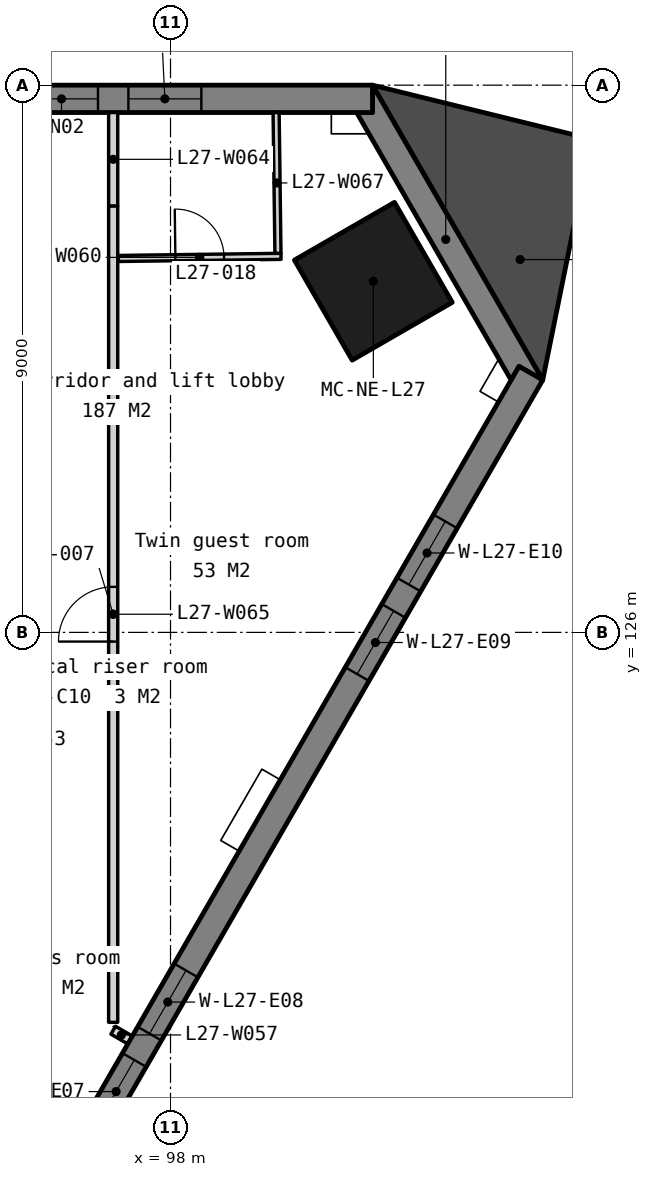
"""IFC4 building model, lengths in metres.
Left out: names, types, materials, properties, quantities, classifications, styles, units other than length and angle.
Written with IfcOpenShell. Run it as: python <this file> out.ifc"""

import sys

from ifc_helpers import new_model, si_unit, direction, frame, frame_2d, origin, origin_2d, place, context, subcontext, project, spatial, polyline, rectangle, outline, extrude, element, fill, save


model = new_model("IFC4")
c1 = context("Model", 3, precision=1e-05, world=origin(), true_north=direction((0.0, 1.0)))
c2 = subcontext(c1, "Body", "Model", "MODEL_VIEW")
j1 = project(units=[si_unit("LENGTHUNIT", "METRE"), si_unit("PLANEANGLEUNIT", "RADIAN")], contexts=[c1])
p1 = place(None, origin())
s1 = spatial("IfcSite", under=j1, at=p1, CompositionType="ELEMENT")
p2 = place(p1, origin())
s2 = spatial("IfcBuilding", under=s1, at=p2, CompositionType="ELEMENT")
p3 = place(p2, frame((0.0, 0.0, 109.8)))
s3 = spatial("IfcBuildingStorey", under=s2, at=p3, CompositionType="ELEMENT", Elevation=109.8)
p4 = place(p3, frame((101.336, 131.775, 0.0), z_axis=(0.0, 0.0, 1.0), x_axis=(-0.5, 0.866025403784, 0.0)))
e1 = element("IfcColumn", 1, at=p4, inside=s3, PredefinedType="COLUMN", context=c2, shape_type="SweptSolid", body=[
    extrude(rectangle(XDim=1.9, YDim=1.9, at=origin_2d()), origin(), (0.0, 0.0, 1.0), 3.5),
])
p5 = place(p3, frame((0.0, 0.0, -0.15)))
e2 = element("IfcWall", 2, at=p5, inside=s3, PredefinedType="SOLIDWALL", context=c2, shape_type="SweptSolid", body=[
    extrude(outline(polyline([(104.122, 130.15), (103.732, 130.375), (103.602, 130.15), (101.062, 134.55), (101.322, 134.55), (101.322, 135.0), (104.122, 130.15)])), origin(), (0.0, 0.0, 1.0), 3.5),
])
p6 = place(p3, frame((101.322, 134.775, -0.15), z_axis=(0.0, 0.0, 1.0), x_axis=(-1.0, 0.0, 0.0)))
e3 = element("IfcWall", 3, at=p6, inside=s3, PredefinedType="SOLIDWALL", context=c2, shape_type="SweptSolid", body=[
    extrude(outline(polyline([(42.643, 0.0), (42.643, 3.5), (0.0, 3.5), (0.0, 0.0), (42.643, 0.0)])), frame((0.0, 0.225, 0.0), z_axis=(0.0, -1.0, 0.0), x_axis=(1.0, 0.0, 0.0)), (0.0, 0.0, 1.0), 0.45),
])
p7 = place(p6, frame((2.814, 0.0, 1.05)))
e4 = element("IfcOpeningElement", 4, at=p7, cuts=e3, PredefinedType="OPENING", context=c2, shape_type="SweptSolid", body=[
    extrude(rectangle(XDim=1.2, YDim=1.5, at=frame_2d((0.6, 0.75))), frame((0.0, 0.235, 0.0), z_axis=(0.0, -1.0, 0.0), x_axis=(1.0, 0.0, 0.0)), (0.0, 0.0, 1.0), 0.47),
])
p8 = place(p6, frame((4.514, 0.0, 1.05)))
e5 = element("IfcOpeningElement", 5, at=p8, cuts=e3, PredefinedType="OPENING", context=c2, shape_type="SweptSolid", body=[
    extrude(rectangle(XDim=1.2, YDim=1.5, at=frame_2d((0.6, 0.75))), frame((0.0, 0.235, 0.0), z_axis=(0.0, -1.0, 0.0), x_axis=(1.0, 0.0, 0.0)), (0.0, 0.0, 1.0), 0.47),
])
p9 = place(p6, frame((11.343, 0.0, 1.05)))
e6 = element("IfcOpeningElement", 6, at=p9, cuts=e3, PredefinedType="OPENING", context=c2, shape_type="SweptSolid", body=[
    extrude(rectangle(XDim=1.2, YDim=1.5, at=frame_2d((0.6, 0.75))), frame((0.0, 0.235, 0.0), z_axis=(0.0, -1.0, 0.0), x_axis=(1.0, 0.0, 0.0)), (0.0, 0.0, 1.0), 0.47),
])
p10 = place(p6, frame((13.043, 0.0, 1.05)))
e7 = element("IfcOpeningElement", 7, at=p10, cuts=e3, PredefinedType="OPENING", context=c2, shape_type="SweptSolid", body=[
    extrude(rectangle(XDim=1.2, YDim=1.5, at=frame_2d((0.6, 0.75))), frame((0.0, 0.235, 0.0), z_axis=(0.0, -1.0, 0.0), x_axis=(1.0, 0.0, 0.0)), (0.0, 0.0, 1.0), 0.47),
])
p11 = place(p6, frame((19.872, 0.0, 1.05)))
e8 = element("IfcOpeningElement", 8, at=p11, cuts=e3, PredefinedType="OPENING", context=c2, shape_type="SweptSolid", body=[
    extrude(rectangle(XDim=1.2, YDim=1.5, at=frame_2d((0.6, 0.75))), frame((0.0, 0.235, 0.0), z_axis=(0.0, -1.0, 0.0), x_axis=(1.0, 0.0, 0.0)), (0.0, 0.0, 1.0), 0.47),
])
p12 = place(p6, frame((21.572, 0.0, 1.05)))
e9 = element("IfcOpeningElement", 9, at=p12, cuts=e3, PredefinedType="OPENING", context=c2, shape_type="SweptSolid", body=[
    extrude(rectangle(XDim=1.2, YDim=1.5, at=frame_2d((0.6, 0.75))), frame((0.0, 0.235, 0.0), z_axis=(0.0, -1.0, 0.0), x_axis=(1.0, 0.0, 0.0)), (0.0, 0.0, 1.0), 0.47),
])
p13 = place(p6, frame((28.4, 0.0, 1.05)))
e10 = element("IfcOpeningElement", 10, at=p13, cuts=e3, PredefinedType="OPENING", context=c2, shape_type="SweptSolid", body=[
    extrude(rectangle(XDim=1.2, YDim=1.5, at=frame_2d((0.6, 0.75))), frame((0.0, 0.235, 0.0), z_axis=(0.0, -1.0, 0.0), x_axis=(1.0, 0.0, 0.0)), (0.0, 0.0, 1.0), 0.47),
])
p14 = place(p6, frame((30.1, 0.0, 1.05)))
e11 = element("IfcOpeningElement", 11, at=p14, cuts=e3, PredefinedType="OPENING", context=c2, shape_type="SweptSolid", body=[
    extrude(rectangle(XDim=1.2, YDim=1.5, at=frame_2d((0.6, 0.75))), frame((0.0, 0.235, 0.0), z_axis=(0.0, -1.0, 0.0), x_axis=(1.0, 0.0, 0.0)), (0.0, 0.0, 1.0), 0.47),
])
p15 = place(p6, frame((36.929, 0.0, 1.05)))
e12 = element("IfcOpeningElement", 12, at=p15, cuts=e3, PredefinedType="OPENING", context=c2, shape_type="SweptSolid", body=[
    extrude(rectangle(XDim=1.2, YDim=1.5, at=frame_2d((0.6, 0.75))), frame((0.0, 0.235, 0.0), z_axis=(0.0, -1.0, 0.0), x_axis=(1.0, 0.0, 0.0)), (0.0, 0.0, 1.0), 0.47),
])
p16 = place(p6, frame((38.629, 0.0, 1.05)))
e13 = element("IfcOpeningElement", 13, at=p16, cuts=e3, PredefinedType="OPENING", context=c2, shape_type="SweptSolid", body=[
    extrude(rectangle(XDim=1.2, YDim=1.5, at=frame_2d((0.6, 0.75))), frame((0.0, 0.235, 0.0), z_axis=(0.0, -1.0, 0.0), x_axis=(1.0, 0.0, 0.0)), (0.0, 0.0, 1.0), 0.47),
])
p17 = place(p3, frame((82.605, 93.333, -0.15), z_axis=(0.0, 0.0, 1.0), x_axis=(0.500000478905, 0.866025127289, 0.0)))
e14 = element("IfcWall", 14, at=p17, inside=s3, PredefinedType="SOLIDWALL", context=c2, shape_type="SweptSolid", body=[
    extrude(outline(polyline([(42.643, 0.0), (42.643, 3.5), (0.0, 3.5), (0.0, 0.0), (42.643, 0.0)])), frame((0.0, 0.225, 0.0), z_axis=(0.0, -1.0, 0.0), x_axis=(1.0, 0.0, 0.0)), (0.0, 0.0, 1.0), 0.45),
])
p18 = place(p17, frame((2.814, 0.0, 1.05)))
e15 = element("IfcOpeningElement", 15, at=p18, cuts=e14, PredefinedType="OPENING", context=c2, shape_type="SweptSolid", body=[
    extrude(rectangle(XDim=1.2, YDim=1.5, at=frame_2d((0.6, 0.75))), frame((0.0, 0.235, 0.0), z_axis=(0.0, -1.0, 0.0), x_axis=(1.0, 0.0, 0.0)), (0.0, 0.0, 1.0), 0.47),
])
p19 = place(p17, frame((4.514, 0.0, 1.05)))
e16 = element("IfcOpeningElement", 16, at=p19, cuts=e14, PredefinedType="OPENING", context=c2, shape_type="SweptSolid", body=[
    extrude(rectangle(XDim=1.2, YDim=1.5, at=frame_2d((0.6, 0.75))), frame((0.0, 0.235, 0.0), z_axis=(0.0, -1.0, 0.0), x_axis=(1.0, 0.0, 0.0)), (0.0, 0.0, 1.0), 0.47),
])
p20 = place(p17, frame((11.343, 0.0, 1.05)))
e17 = element("IfcOpeningElement", 17, at=p20, cuts=e14, PredefinedType="OPENING", context=c2, shape_type="SweptSolid", body=[
    extrude(rectangle(XDim=1.2, YDim=1.5, at=frame_2d((0.6, 0.75))), frame((0.0, 0.235, 0.0), z_axis=(0.0, -1.0, 0.0), x_axis=(1.0, 0.0, 0.0)), (0.0, 0.0, 1.0), 0.47),
])
p21 = place(p17, frame((13.043, 0.0, 1.05)))
e18 = element("IfcOpeningElement", 18, at=p21, cuts=e14, PredefinedType="OPENING", context=c2, shape_type="SweptSolid", body=[
    extrude(rectangle(XDim=1.2, YDim=1.5, at=frame_2d((0.6, 0.75))), frame((0.0, 0.235, 0.0), z_axis=(0.0, -1.0, 0.0), x_axis=(1.0, 0.0, 0.0)), (0.0, 0.0, 1.0), 0.47),
])
p22 = place(p17, frame((19.872, 0.0, 1.05)))
e19 = element("IfcOpeningElement", 19, at=p22, cuts=e14, PredefinedType="OPENING", context=c2, shape_type="SweptSolid", body=[
    extrude(rectangle(XDim=1.2, YDim=1.5, at=frame_2d((0.6, 0.75))), frame((0.0, 0.235, 0.0), z_axis=(0.0, -1.0, 0.0), x_axis=(1.0, 0.0, 0.0)), (0.0, 0.0, 1.0), 0.47),
])
p23 = place(p17, frame((21.572, 0.0, 1.05)))
e20 = element("IfcOpeningElement", 20, at=p23, cuts=e14, PredefinedType="OPENING", context=c2, shape_type="SweptSolid", body=[
    extrude(rectangle(XDim=1.2, YDim=1.5, at=frame_2d((0.6, 0.75))), frame((0.0, 0.235, 0.0), z_axis=(0.0, -1.0, 0.0), x_axis=(1.0, 0.0, 0.0)), (0.0, 0.0, 1.0), 0.47),
])
p24 = place(p17, frame((28.4, 0.0, 1.05)))
e21 = element("IfcOpeningElement", 21, at=p24, cuts=e14, PredefinedType="OPENING", context=c2, shape_type="SweptSolid", body=[
    extrude(rectangle(XDim=1.2, YDim=1.5, at=frame_2d((0.6, 0.75))), frame((0.0, 0.235, 0.0), z_axis=(0.0, -1.0, 0.0), x_axis=(1.0, 0.0, 0.0)), (0.0, 0.0, 1.0), 0.47),
])
p25 = place(p17, frame((30.1, 0.0, 1.05)))
e22 = element("IfcOpeningElement", 22, at=p25, cuts=e14, PredefinedType="OPENING", context=c2, shape_type="SweptSolid", body=[
    extrude(rectangle(XDim=1.2, YDim=1.5, at=frame_2d((0.6, 0.75))), frame((0.0, 0.235, 0.0), z_axis=(0.0, -1.0, 0.0), x_axis=(1.0, 0.0, 0.0)), (0.0, 0.0, 1.0), 0.47),
])
p26 = place(p17, frame((36.929, 0.0, 1.05)))
e23 = element("IfcOpeningElement", 23, at=p26, cuts=e14, PredefinedType="OPENING", context=c2, shape_type="SweptSolid", body=[
    extrude(rectangle(XDim=1.2, YDim=1.5, at=frame_2d((0.6, 0.75))), frame((0.0, 0.235, 0.0), z_axis=(0.0, -1.0, 0.0), x_axis=(1.0, 0.0, 0.0)), (0.0, 0.0, 1.0), 0.47),
])
p27 = place(p17, frame((38.629, 0.0, 1.05)))
e24 = element("IfcOpeningElement", 24, at=p27, cuts=e14, PredefinedType="OPENING", context=c2, shape_type="SweptSolid", body=[
    extrude(rectangle(XDim=1.2, YDim=1.5, at=frame_2d((0.6, 0.75))), frame((0.0, 0.235, 0.0), z_axis=(0.0, -1.0, 0.0), x_axis=(1.0, 0.0, 0.0)), (0.0, 0.0, 1.0), 0.47),
])
p28 = place(p3, frame((0.0, 0.0, -0.15)))
e25 = element("IfcWall", 25, at=p28, inside=s3, PredefinedType="SOLIDWALL", context=c2, shape_type="SweptSolid", body=[
    extrude(outline(polyline([(104.122, 130.15), (104.923, 134.113), (101.322, 135.0), (104.122, 130.15)])), origin(), (0.0, 0.0, 1.0), 3.5),
])
p29 = place(p3, frame((97.057, 119.457, 0.0), z_axis=(0.0, 0.0, 1.0), x_axis=(0.866159461733, -0.499767732902, 0.0)))
e26 = element("IfcWall", 26, at=p29, inside=s3, PredefinedType="PARTITIONING", context=c2, shape_type="SweptSolid", body=[
    extrude(rectangle(XDim=0.311, YDim=0.15, at=frame_2d((0.156, 0.0))), origin(), (0.0, 0.0, 1.0), 3.35),
])
p30 = place(p3, frame((97.143, 132.15, 0.0), z_axis=(0.0, 0.0, 1.0), x_axis=(0.999914830804, 0.013051097189, 0.0)))
e27 = element("IfcWall", 27, at=p30, inside=s3, PredefinedType="PARTITIONING", context=c2, shape_type="SweptSolid", body=[
    extrude(rectangle(XDim=2.675, YDim=0.1, at=frame_2d((1.337, 0.0))), origin(), (0.0, 0.0, 1.0), 3.35),
])
p31 = place(p30, frame((0.938, 0.0, 0.0)))
e28 = element("IfcOpeningElement", 28, at=p31, cuts=e27, PredefinedType="OPENING", context=c2, shape_type="SweptSolid", body=[
    extrude(rectangle(XDim=0.8, YDim=2.1, at=frame_2d((0.4, 1.05))), frame((0.0, 0.06, 0.0), z_axis=(0.0, -1.0, 0.0), x_axis=(1.0, 0.0, 0.0)), (0.0, 0.0, 1.0), 0.12),
])
p32 = place(p3, frame((97.057, 133.011, 0.0), z_axis=(0.0, 0.0, 1.0), x_axis=(0.0, 1.0, 0.0)))
e29 = element("IfcWall", 29, at=p32, inside=s3, PredefinedType="PARTITIONING", context=c2, shape_type="SweptSolid", body=[
    extrude(rectangle(XDim=1.539, YDim=0.15, at=frame_2d((0.77, 0.0))), origin(), (0.0, 0.0, 1.0), 3.35),
])
p33 = place(p3, frame((97.057, 119.587, 0.0), z_axis=(0.0, 0.0, 1.0), x_axis=(0.0, 1.0, 0.0)))
e30 = element("IfcWall", 30, at=p33, inside=s3, PredefinedType="PARTITIONING", context=c2, shape_type="SweptSolid", body=[
    extrude(rectangle(XDim=13.424, YDim=0.15, at=frame_2d((6.712, 0.0))), origin(), (0.0, 0.0, 1.0), 3.35),
])
p34 = place(p33, frame((6.262, 0.0, 0.0)))
e31 = element("IfcOpeningElement", 31, at=p34, cuts=e30, PredefinedType="OPENING", context=c2, shape_type="SweptSolid", body=[
    extrude(rectangle(XDim=0.9, YDim=2.1, at=frame_2d((0.45, 1.05))), frame((0.0, 0.085, 0.0), z_axis=(0.0, -1.0, 0.0), x_axis=(1.0, 0.0, 0.0)), (0.0, 0.0, 1.0), 0.17),
])
p35 = place(p3, frame((99.737, 134.55, 0.0), z_axis=(0.0, 0.0, 1.0), x_axis=(0.012965387027, -0.999915945837, 0.0)))
e32 = element("IfcWall", 32, at=p35, inside=s3, PredefinedType="PARTITIONING", context=c2, shape_type="SweptSolid", body=[
    extrude(rectangle(XDim=2.316, YDim=0.1, at=frame_2d((1.158, 0.0))), origin(), (0.0, 0.0, 1.0), 3.35),
])
p36 = place(p7, origin())
e33 = element("IfcWindow", 33, at=p36, inside=s3, PartitioningType="SINGLE_PANEL", PredefinedType="WINDOW", context=c2, shape_type="SweptSolid", body=[
    extrude(rectangle(XDim=1.2, YDim=1.5, at=frame_2d((0.6, 0.75))), frame((0.0, 0.03, 0.0), z_axis=(0.0, -1.0, 0.0), x_axis=(1.0, 0.0, 0.0)), (0.0, 0.0, 1.0), 0.06),
])
fill(e4, e33)
p37 = place(p8, origin())
e34 = element("IfcWindow", 34, at=p37, inside=s3, PartitioningType="SINGLE_PANEL", PredefinedType="WINDOW", context=c2, shape_type="SweptSolid", body=[
    extrude(rectangle(XDim=1.2, YDim=1.5, at=frame_2d((0.6, 0.75))), frame((0.0, 0.03, 0.0), z_axis=(0.0, -1.0, 0.0), x_axis=(1.0, 0.0, 0.0)), (0.0, 0.0, 1.0), 0.06),
])
fill(e5, e34)
p38 = place(p24, origin())
e35 = element("IfcWindow", 35, at=p38, inside=s3, PartitioningType="SINGLE_PANEL", PredefinedType="WINDOW", context=c2, shape_type="SweptSolid", body=[
    extrude(rectangle(XDim=1.2, YDim=1.5, at=frame_2d((0.6, 0.75))), frame((0.0, 0.03, 0.0), z_axis=(0.0, -1.0, 0.0), x_axis=(1.0, 0.0, 0.0)), (0.0, 0.0, 1.0), 0.06),
])
fill(e21, e35)
p39 = place(p25, origin())
e36 = element("IfcWindow", 36, at=p39, inside=s3, PartitioningType="SINGLE_PANEL", PredefinedType="WINDOW", context=c2, shape_type="SweptSolid", body=[
    extrude(rectangle(XDim=1.2, YDim=1.5, at=frame_2d((0.6, 0.75))), frame((0.0, 0.03, 0.0), z_axis=(0.0, -1.0, 0.0), x_axis=(1.0, 0.0, 0.0)), (0.0, 0.0, 1.0), 0.06),
])
fill(e22, e36)
p40 = place(p26, origin())
e37 = element("IfcWindow", 37, at=p40, inside=s3, PartitioningType="SINGLE_PANEL", PredefinedType="WINDOW", context=c2, shape_type="SweptSolid", body=[
    extrude(rectangle(XDim=1.2, YDim=1.5, at=frame_2d((0.6, 0.75))), frame((0.0, 0.03, 0.0), z_axis=(0.0, -1.0, 0.0), x_axis=(1.0, 0.0, 0.0)), (0.0, 0.0, 1.0), 0.06),
])
fill(e23, e37)
p41 = place(p27, origin())
e38 = element("IfcWindow", 38, at=p41, inside=s3, PartitioningType="SINGLE_PANEL", PredefinedType="WINDOW", context=c2, shape_type="SweptSolid", body=[
    extrude(rectangle(XDim=1.2, YDim=1.5, at=frame_2d((0.6, 0.75))), frame((0.0, 0.03, 0.0), z_axis=(0.0, -1.0, 0.0), x_axis=(1.0, 0.0, 0.0)), (0.0, 0.0, 1.0), 0.06),
])
fill(e24, e38)
p42 = place(p34, origin())
e39 = element("IfcDoor", 39, at=p42, inside=s3, OperationType="SINGLE_SWING_LEFT", PredefinedType="DOOR", context=c2, shape_type="SweptSolid", body=[
    extrude(rectangle(XDim=0.9, YDim=2.1, at=frame_2d((0.45, 1.05))), frame((0.0, 0.025, 0.0), z_axis=(0.0, -1.0, 0.0), x_axis=(1.0, 0.0, 0.0)), (0.0, 0.0, 1.0), 0.05),
])
fill(e31, e39)
p43 = place(p31, origin())
e40 = element("IfcDoor", 40, at=p43, inside=s3, OperationType="SINGLE_SWING_LEFT", PredefinedType="DOOR", context=c2, shape_type="SweptSolid", body=[
    extrude(rectangle(XDim=0.8, YDim=2.1, at=frame_2d((0.4, 1.05))), frame((0.0, 0.025, 0.0), z_axis=(0.0, -1.0, 0.0), x_axis=(1.0, 0.0, 0.0)), (0.0, 0.0, 1.0), 0.05),
])
fill(e28, e40)
save(model, sys.argv[1])
